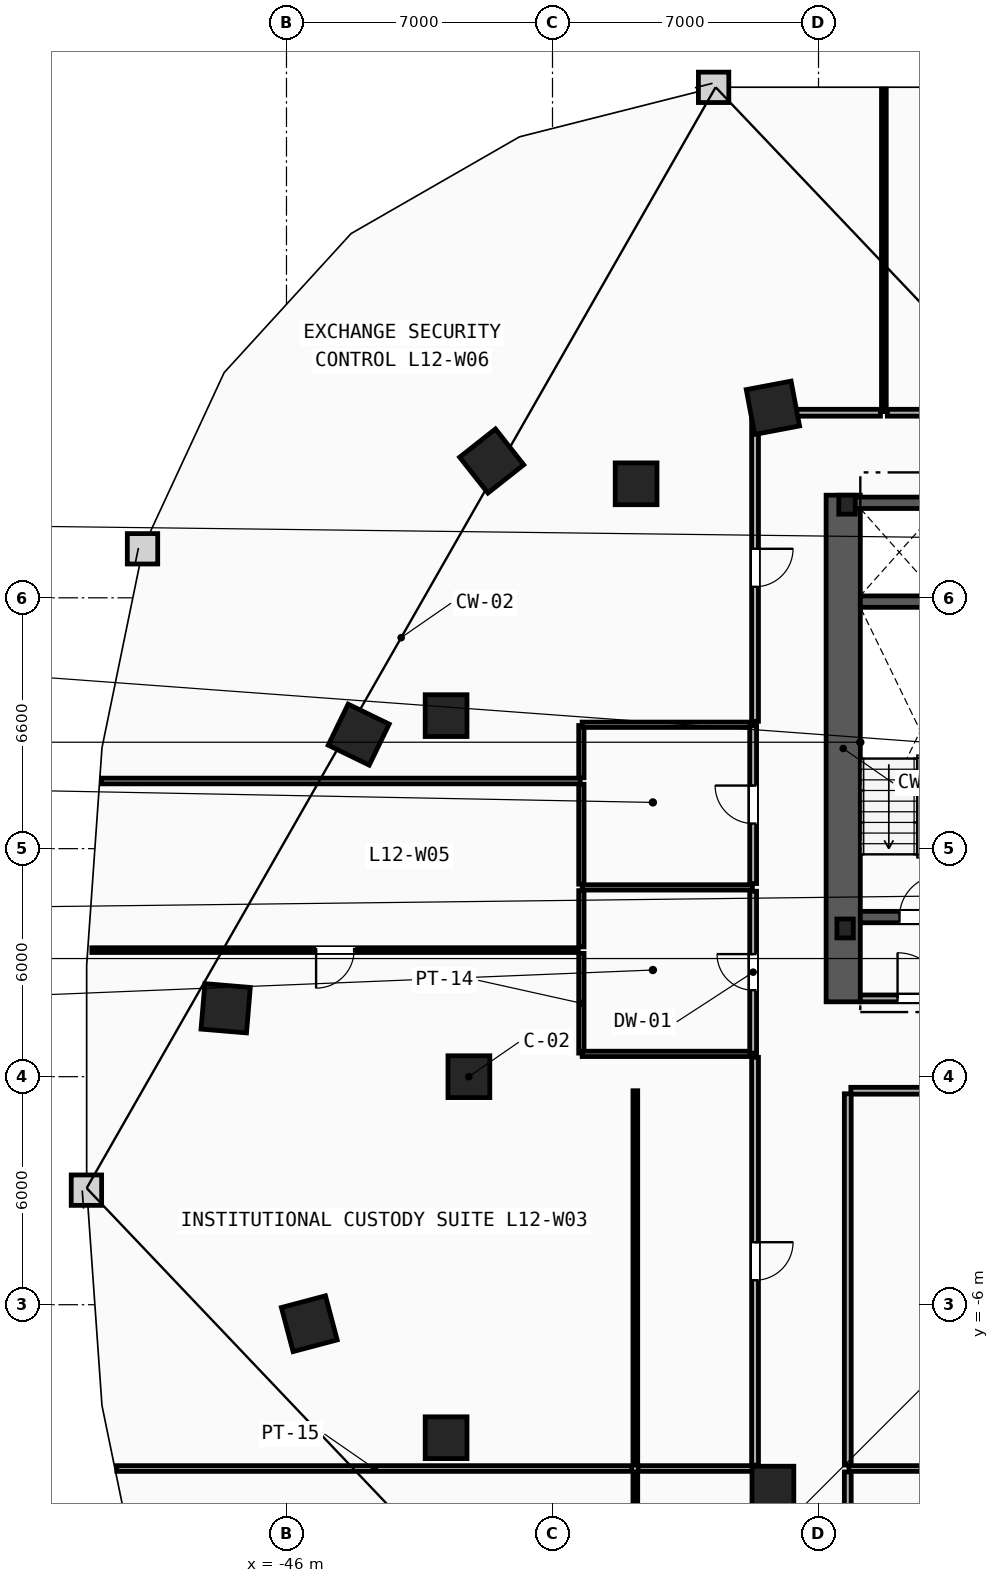
"""IFC4 building model, lengths in metres.
Left out: names, types, materials, properties, quantities, classifications, styles, units other than length and angle.
Written with IfcOpenShell. Run it as: python <this file> out.ifc"""

import sys

from ifc_helpers import new_model, si_unit, direction, frame, frame_2d, origin, origin_2d, place, context, subcontext, project, spatial, rectangle, i_section, extrude, element, fill, save


model = new_model("IFC4")
c1 = context("Model", 3, precision=1e-05, world=origin(), true_north=direction((0.0, 1.0)))
c2 = subcontext(c1, "Body", "Model", "MODEL_VIEW")
j1 = project(units=[si_unit("LENGTHUNIT", "METRE"), si_unit("PLANEANGLEUNIT", "RADIAN")], contexts=[c1])
p1 = place(None, origin())
s1 = spatial("IfcSite", under=j1, at=p1, CompositionType="ELEMENT")
p2 = place(p1, origin())
s2 = spatial("IfcBuilding", under=s1, at=p2, CompositionType="ELEMENT")
p3 = place(p2, frame((0.0, 0.0, 50.6)))
s3 = spatial("IfcBuildingStorey", under=s2, at=p3, CompositionType="ELEMENT", Elevation=50.6)
for number, where, z_axis, x_axis in (
    (1, (-31.3, 3.9, 0.0), (0.0, 0.0, 1.0), (1.0, 0.0, 0.0)),
    (2, (-31.25, 15.05, 0.0), (0.0, 0.0, 1.0), (1.0, 0.0, 0.0)),
):
    element("IfcColumn", number, at=place(p3, frame(where, z_axis=z_axis, x_axis=x_axis)), inside=s3, PredefinedType="COLUMN", context=c2, shape_type="SweptSolid", body=[
        extrude(i_section(OverallWidth=0.432, OverallDepth=0.498, WebThickness=0.056, FlangeThickness=0.089, FilletRadius=0.018, at=origin_2d()), origin(), (0.0, 0.0, 1.0), 3.8),
    ])
for number, where, z_axis, x_axis in (
    (3, (-41.2, 0.0, 0.0), (0.0, 0.0, 1.0), (1.0, 0.0, 0.0)),
    (4, (-41.8, 9.5, 0.0), (0.0, 0.0, 1.0), (1.0, 0.0, 0.0)),
    (5, (-36.8, 15.6, 0.0), (0.0, 0.0, 1.0), (1.0, 0.0, 0.0)),
    (6, (-41.8, -9.5, 0.0), (0.0, 0.0, 1.0), (1.0, 0.0, 0.0)),
    (7, (-33.2, -10.8, 0.0), (0.0, 0.0, 1.0), (1.0, 0.0, 0.0)),
):
    element("IfcColumn", number, at=place(p3, frame(where, z_axis=z_axis, x_axis=x_axis)), inside=s3, PredefinedType="COLUMN", context=c2, shape_type="SweptSolid", body=[
        extrude(rectangle(XDim=1.1, YDim=1.1, at=origin_2d()), origin(), (0.0, 0.0, 1.0), 3.8),
    ])
for number, where, z_axis, x_axis in (
    (8, (-33.2, 17.6, 0.0), (0.0, 0.0, 1.0), (-0.983, -0.186, 0.0)),
    (9, (-40.6, 16.2, 0.0), (0.0, 0.0, 1.0), (-0.785, -0.619, 0.0)),
    (10, (-44.1, 9.0, 0.0), (0.0, 0.0, 1.0), (-0.437, -0.899, 0.0)),
    (11, (-47.6, 1.8, 0.0), (0.0, 0.0, 1.0), (-0.084, -0.997, 0.0)),
    (12, (-45.4, -6.5, 0.0), (0.0, 0.0, 1.0), (0.256, -0.967, 0.0)),
):
    element("IfcColumn", number, at=place(p3, frame(where, z_axis=z_axis, x_axis=x_axis)), inside=s3, PredefinedType="COLUMN", context=c2, shape_type="SweptSolid", body=[
        extrude(rectangle(XDim=1.2, YDim=1.2, at=origin_2d()), origin(), (0.0, 0.0, 1.0), 3.8),
    ])
p4 = place(p3, frame((-31.35, 1.97, 0.0), z_axis=(0.0, 0.0, 1.0), x_axis=(0.0, 1.0, 0.0)))
e13 = element("IfcWall", 13, at=p4, inside=s3, PredefinedType="SHEAR", context=c2, shape_type="SweptSolid", body=[
    extrude(rectangle(XDim=13.33, YDim=0.9, at=frame_2d((6.665, 0.0))), origin(), (0.0, 0.0, 1.0), 3.5),
])
p5 = place(p3, frame((-30.9, 4.2, 0.0), z_axis=(0.0, 0.0, 1.0), x_axis=(1.0, 0.0, 0.0)))
e14 = element("IfcWall", 14, at=p5, inside=s3, PredefinedType="SHEAR", context=c2, shape_type="SweptSolid", body=[
    extrude(rectangle(XDim=3.16, YDim=0.3, at=frame_2d((1.58, 0.0))), origin(), (0.0, 0.0, 1.0), 3.5),
])
p6 = place(p5, frame((1.03, 0.0, 0.0)))
e15 = element("IfcOpeningElement", 15, at=p6, cuts=e14, PredefinedType="OPENING", context=c2, shape_type="SweptSolid", body=[
    extrude(rectangle(XDim=1.1, YDim=2.15, at=frame_2d((0.55, 1.075))), frame((0.0, 0.16, 0.0), z_axis=(0.0, -1.0, 0.0), x_axis=(1.0, 0.0, 0.0)), (0.0, 0.0, 1.0), 0.32),
])
p7 = place(p3, frame((-30.9, 12.5, 0.0), z_axis=(0.0, 0.0, 1.0), x_axis=(1.0, 0.0, 0.0)))
e16 = element("IfcWall", 16, at=p7, inside=s3, PredefinedType="SHEAR", context=c2, shape_type="SweptSolid", body=[
    extrude(rectangle(XDim=3.16, YDim=0.3, at=frame_2d((1.58, 0.0))), origin(), (0.0, 0.0, 1.0), 3.5),
])
p8 = place(p3, frame((-30.9, 2.06, 0.0), z_axis=(0.0, 0.0, 1.0), x_axis=(1.0, 0.0, 0.0)))
e17 = element("IfcWall", 17, at=p8, inside=s3, PredefinedType="PARTITIONING", context=c2, shape_type="SweptSolid", body=[
    extrude(rectangle(XDim=3.16, YDim=0.18, at=frame_2d((1.58, 0.0))), origin(), (0.0, 0.0, 1.0), 3.5),
])
p9 = place(p8, frame((0.98, 0.0, 0.0)))
e18 = element("IfcOpeningElement", 18, at=p9, cuts=e17, PredefinedType="OPENING", context=c2, shape_type="SweptSolid", body=[
    extrude(rectangle(XDim=1.2, YDim=2.15, at=frame_2d((0.6, 1.075))), frame((0.0, 0.1, 0.0), z_axis=(0.0, -1.0, 0.0), x_axis=(1.0, 0.0, 0.0)), (0.0, 0.0, 1.0), 0.2),
])
p10 = place(p3, frame((-31.2, 15.1, 0.0), z_axis=(0.0, 0.0, 1.0), x_axis=(1.0, 0.0, 0.0)))
e19 = element("IfcWall", 19, at=p10, inside=s3, PredefinedType="SHEAR", context=c2, shape_type="SweptSolid", body=[
    extrude(rectangle(XDim=2.5, YDim=0.3, at=frame_2d((1.25, 0.0))), origin(), (0.0, 0.0, 1.0), 3.5),
])
p11 = place(p3, frame((-38.24, 0.62, 0.0), z_axis=(0.0, 0.0, 1.0), x_axis=(0.0, 1.0, 0.0)))
e20 = element("IfcWall", 20, at=p11, inside=s3, PredefinedType="PARTITIONING", context=c2, shape_type="SweptSolid", body=[
    extrude(rectangle(XDim=2.625, YDim=0.14, at=frame_2d((1.312, 0.0))), origin(), (0.0, 0.0, 1.0), 3.5),
])
p12 = place(p3, frame((-38.24, 3.415, 0.0), z_axis=(0.0, 0.0, 1.0), x_axis=(0.0, 1.0, 0.0)))
e21 = element("IfcWall", 21, at=p12, inside=s3, PredefinedType="PARTITIONING", context=c2, shape_type="SweptSolid", body=[
    extrude(rectangle(XDim=1.48, YDim=0.14, at=frame_2d((0.74, 0.0))), origin(), (0.0, 0.0, 1.0), 3.5),
])
p13 = place(p3, frame((-38.24, 5.065, 0.0), z_axis=(0.0, 0.0, 1.0), x_axis=(0.0, 1.0, 0.0)))
e22 = element("IfcWall", 22, at=p13, inside=s3, PredefinedType="PARTITIONING", context=c2, shape_type="SweptSolid", body=[
    extrude(rectangle(XDim=2.63, YDim=0.14, at=frame_2d((1.315, 0.0))), origin(), (0.0, 0.0, 1.0), 3.5),
])
p14 = place(p3, frame((-38.24, 7.865, 0.0), z_axis=(0.0, 0.0, 1.0), x_axis=(0.0, 1.0, 0.0)))
e23 = element("IfcWall", 23, at=p14, inside=s3, PredefinedType="PARTITIONING", context=c2, shape_type="SweptSolid", body=[
    extrude(rectangle(XDim=1.375, YDim=0.14, at=frame_2d((0.688, 0.0))), origin(), (0.0, 0.0, 1.0), 3.5),
])
for number, where, z_axis, x_axis in (
    (24, (-38.22, 0.6, 0.0), (0.0, 0.0, 1.0), (1.0, 0.0, 0.0)),
    (25, (-38.22, 4.98, 0.0), (0.0, 0.0, 1.0), (1.0, 0.0, 0.0)),
    (26, (-38.22, 9.26, 0.0), (0.0, 0.0, 1.0), (1.0, 0.0, 0.0)),
):
    element("IfcWall", number, at=place(p3, frame(where, z_axis=z_axis, x_axis=x_axis)), inside=s3, PredefinedType="PARTITIONING", context=c2, shape_type="SweptSolid", body=[
        extrude(rectangle(XDim=4.48, YDim=0.14, at=frame_2d((2.24, 0.0))), origin(), (0.0, 0.0, 1.0), 3.5),
    ])
p15 = place(p3, frame((-33.72, 0.62, 0.0), z_axis=(0.0, 0.0, 1.0), x_axis=(0.0, 1.0, 0.0)))
e27 = element("IfcWall", 27, at=p15, inside=s3, PredefinedType="PARTITIONING", context=c2, shape_type="SweptSolid", body=[
    extrude(rectangle(XDim=4.26, YDim=0.18, at=frame_2d((2.13, 0.0))), origin(), (0.0, 0.0, 1.0), 3.5),
])
p16 = place(p15, frame((1.655, 0.0, 0.0)))
e28 = element("IfcOpeningElement", 28, at=p16, cuts=e27, PredefinedType="OPENING", context=c2, shape_type="SweptSolid", body=[
    extrude(rectangle(XDim=0.95, YDim=2.1, at=frame_2d((0.475, 1.05))), frame((0.0, 0.1, 0.0), z_axis=(0.0, -1.0, 0.0), x_axis=(1.0, 0.0, 0.0)), (0.0, 0.0, 1.0), 0.2),
])
p17 = place(p3, frame((-33.72, 5.08, 0.0), z_axis=(0.0, 0.0, 1.0), x_axis=(0.0, 1.0, 0.0)))
e29 = element("IfcWall", 29, at=p17, inside=s3, PredefinedType="PARTITIONING", context=c2, shape_type="SweptSolid", body=[
    extrude(rectangle(XDim=4.16, YDim=0.18, at=frame_2d((2.08, 0.0))), origin(), (0.0, 0.0, 1.0), 3.5),
])
p18 = place(p17, frame((1.58, 0.0, 0.0)))
e30 = element("IfcOpeningElement", 30, at=p18, cuts=e29, PredefinedType="OPENING", context=c2, shape_type="SweptSolid", body=[
    extrude(rectangle(XDim=1.0, YDim=2.15, at=frame_2d((0.5, 1.075))), frame((0.0, 0.1, 0.0), z_axis=(0.0, -1.0, 0.0), x_axis=(1.0, 0.0, 0.0)), (0.0, 0.0, 1.0), 0.2),
])
p19 = place(p3, frame((-36.82, -11.45, 0.0), z_axis=(0.0, 0.0, 1.0), x_axis=(0.0, 1.0, 0.0)))
e31 = element("IfcWall", 31, at=p19, inside=s3, PredefinedType="PARTITIONING", context=c2, shape_type="SweptSolid", body=[
    extrude(rectangle(XDim=1.055, YDim=0.125, at=frame_2d((0.527, 0.0))), origin(), (0.0, 0.0, 1.0), 3.5),
])
p20 = place(p3, frame((-36.82, -10.225, 0.0), z_axis=(0.0, 0.0, 1.0), x_axis=(0.0, 1.0, 0.0)))
e32 = element("IfcWall", 32, at=p20, inside=s3, PredefinedType="PARTITIONING", context=c2, shape_type="SweptSolid", body=[
    extrude(rectangle(XDim=9.855, YDim=0.125, at=frame_2d((4.927, 0.0))), origin(), (0.0, 0.0, 1.0), 3.5),
])
p21 = place(p3, frame((-50.464, -10.31, 0.0), z_axis=(0.0, 0.0, 1.0), x_axis=(1.0, 0.0, 0.0)))
e33 = element("IfcWall", 33, at=p21, inside=s3, PredefinedType="PARTITIONING", context=c2, shape_type="SweptSolid", body=[
    extrude(rectangle(XDim=13.549, YDim=0.15, at=frame_2d((6.774, 0.0))), origin(), (0.0, 0.0, 1.0), 2.805),
])
p22 = place(p3, frame((-36.745, -10.31, 0.0), z_axis=(0.0, 0.0, 1.0), x_axis=(1.0, 0.0, 0.0)))
e34 = element("IfcWall", 34, at=p22, inside=s3, PredefinedType="PARTITIONING", context=c2, shape_type="SweptSolid", body=[
    extrude(rectangle(XDim=3.045, YDim=0.15, at=frame_2d((1.522, 0.0))), origin(), (0.0, 0.0, 1.0), 2.805),
])
p23 = place(p3, frame((-31.2, -10.31, 0.0), z_axis=(0.0, 0.0, 1.0), x_axis=(1.0, 0.0, 0.0)))
e35 = element("IfcWall", 35, at=p23, inside=s3, PredefinedType="PARTITIONING", context=c2, shape_type="SweptSolid", body=[
    extrude(rectangle(XDim=17.664, YDim=0.15, at=frame_2d((8.832, 0.0))), origin(), (0.0, 0.0, 1.0), 2.805),
])
p24 = place(p3, frame((-50.866, 7.78, 0.0), z_axis=(0.0, 0.0, 1.0), x_axis=(1.0, 0.0, 0.0)))
e36 = element("IfcWall", 36, at=p24, inside=s3, PredefinedType="PARTITIONING", context=c2, shape_type="SweptSolid", body=[
    extrude(rectangle(XDim=12.596, YDim=0.15, at=frame_2d((6.298, 0.0))), origin(), (0.0, 0.0, 1.0), 3.5),
])
p25 = place(p3, frame((-30.28, 17.5, 0.0), z_axis=(0.0, 0.0, 1.0), x_axis=(0.0, 1.0, 0.0)))
e37 = element("IfcWall", 37, at=p25, inside=s3, PredefinedType="PARTITIONING", context=c2, shape_type="SweptSolid", body=[
    extrude(rectangle(XDim=8.485, YDim=0.125, at=frame_2d((4.243, 0.0))), origin(), (0.0, 0.0, 1.0), 3.5),
])
p26 = place(p3, frame((-31.23, -11.4, 0.0), z_axis=(0.0, 0.0, 1.0), x_axis=(0.0, 1.0, 0.0)))
e38 = element("IfcWall", 38, at=p26, inside=s3, PredefinedType="PARTITIONING", context=c2, shape_type="SweptSolid", body=[
    extrude(rectangle(XDim=1.0, YDim=0.18, at=frame_2d((0.5, 0.0))), origin(), (0.0, 0.0, 1.0), 3.5),
])
p27 = place(p3, frame((-33.67, 0.509, 0.0), z_axis=(0.0, 0.0, 1.0), x_axis=(0.0, -1.0, 0.0)))
e39 = element("IfcWall", 39, at=p27, inside=s3, PredefinedType="PARTITIONING", context=c2, shape_type="SweptSolid", body=[
    extrude(rectangle(XDim=10.729, YDim=0.18, at=frame_2d((5.364, 0.0))), origin(), (0.0, 0.0, 1.0), 3.5),
])
p28 = place(p27, frame((4.864, 0.0, 0.0)))
e40 = element("IfcOpeningElement", 40, at=p28, cuts=e39, PredefinedType="OPENING", context=c2, shape_type="SweptSolid", body=[
    extrude(rectangle(XDim=1.0, YDim=2.15, at=frame_2d((0.5, 1.075))), frame((0.0, 0.1, 0.0), z_axis=(0.0, -1.0, 0.0), x_axis=(1.0, 0.0, 0.0)), (0.0, 0.0, 1.0), 0.2),
])
p29 = place(p3, frame((-31.15, -0.37, 0.0), z_axis=(0.0, 0.0, 1.0), x_axis=(1.0, 0.0, 0.0)))
e41 = element("IfcWall", 41, at=p29, inside=s3, PredefinedType="PARTITIONING", context=c2, shape_type="SweptSolid", body=[
    extrude(rectangle(XDim=14.328, YDim=0.18, at=frame_2d((7.164, 0.0))), origin(), (0.0, 0.0, 1.0), 3.5),
])
p30 = place(p29, frame((6.664, 0.0, 0.0)))
e42 = element("IfcOpeningElement", 42, at=p30, cuts=e41, PredefinedType="OPENING", context=c2, shape_type="SweptSolid", body=[
    extrude(rectangle(XDim=1.0, YDim=2.15, at=frame_2d((0.5, 1.075))), frame((0.0, 0.1, 0.0), z_axis=(0.0, -1.0, 0.0), x_axis=(1.0, 0.0, 0.0)), (0.0, 0.0, 1.0), 0.2),
])
p31 = place(p3, frame((-16.822, 17.47, 0.0), z_axis=(0.0, 0.0, 1.0), x_axis=(-1.0, 0.0, 0.0)))
e43 = element("IfcWall", 43, at=p31, inside=s3, PredefinedType="PARTITIONING", context=c2, shape_type="SweptSolid", body=[
    extrude(rectangle(XDim=13.368, YDim=0.18, at=frame_2d((6.684, 0.0))), origin(), (0.0, 0.0, 1.0), 3.5),
])
p32 = place(p3, frame((-31.23, -10.22, 0.0), z_axis=(0.0, 0.0, 1.0), x_axis=(0.0, 1.0, 0.0)))
e44 = element("IfcWall", 44, at=p32, inside=s3, PredefinedType="PARTITIONING", context=c2, shape_type="SweptSolid", body=[
    extrude(rectangle(XDim=9.77, YDim=0.18, at=frame_2d((4.885, 0.0))), origin(), (0.0, 0.0, 1.0), 3.5),
])
p33 = place(p3, frame((-33.67, 17.428, 0.0), z_axis=(0.0, 0.0, 1.0), x_axis=(0.0, -1.0, 0.0)))
e45 = element("IfcWall", 45, at=p33, inside=s3, PredefinedType="PARTITIONING", context=c2, shape_type="SweptSolid", body=[
    extrude(rectangle(XDim=8.077, YDim=0.18, at=frame_2d((4.039, 0.0))), origin(), (0.0, 0.0, 1.0), 3.5),
])
p34 = place(p33, frame((3.539, 0.0, 0.0)))
e46 = element("IfcOpeningElement", 46, at=p34, cuts=e45, PredefinedType="OPENING", context=c2, shape_type="SweptSolid", body=[
    extrude(rectangle(XDim=1.0, YDim=2.15, at=frame_2d((0.5, 1.075))), frame((0.0, 0.1, 0.0), z_axis=(0.0, -1.0, 0.0), x_axis=(1.0, 0.0, 0.0)), (0.0, 0.0, 1.0), 0.2),
])
p35 = place(p3, frame((-30.37, 17.47, 0.0), z_axis=(0.0, 0.0, 1.0), x_axis=(-1.0, 0.0, 0.0)))
e47 = element("IfcWall", 47, at=p35, inside=s3, PredefinedType="PARTITIONING", context=c2, shape_type="SweptSolid", body=[
    extrude(rectangle(XDim=3.258, YDim=0.18, at=frame_2d((1.629, 0.0))), origin(), (0.0, 0.0, 1.0), 3.5),
])
p36 = place(p3, frame((-38.32, 3.33, 0.0), z_axis=(0.0, 0.0, 1.0), x_axis=(-1.0, 0.0, 0.0)))
e48 = element("IfcWall", 48, at=p36, inside=s3, PredefinedType="PARTITIONING", context=c2, shape_type="SweptSolid", body=[
    extrude(rectangle(XDim=12.801, YDim=0.125, at=frame_2d((6.401, 0.0))), origin(), (0.0, 0.0, 1.0), 3.5),
])
p37 = place(p36, frame((5.901, 0.0, 0.0)))
e49 = element("IfcOpeningElement", 49, at=p37, cuts=e48, PredefinedType="OPENING", context=c2, shape_type="SweptSolid", body=[
    extrude(rectangle(XDim=1.0, YDim=2.15, at=frame_2d((0.5, 1.075))), frame((0.0, 0.073, 0.0), z_axis=(0.0, -1.0, 0.0), x_axis=(1.0, 0.0, 0.0)), (0.0, 0.0, 1.0), 0.145),
])
p38 = place(p6, origin())
e50 = element("IfcDoor", 50, at=p38, inside=s3, OperationType="SINGLE_SWING_RIGHT", PredefinedType="DOOR", context=c2, shape_type="SweptSolid", body=[
    extrude(rectangle(XDim=1.1, YDim=2.15, at=frame_2d((0.55, 1.075))), frame((0.0, 0.025, 0.0), z_axis=(0.0, -1.0, 0.0), x_axis=(1.0, 0.0, 0.0)), (0.0, 0.0, 1.0), 0.05),
])
fill(e15, e50)
p39 = place(p9, origin())
e51 = element("IfcDoor", 51, at=p39, inside=s3, OperationType="SINGLE_SWING_LEFT", PredefinedType="DOOR", context=c2, shape_type="SweptSolid", body=[
    extrude(rectangle(XDim=1.2, YDim=2.15, at=frame_2d((0.6, 1.075))), frame((0.0, 0.025, 0.0), z_axis=(0.0, -1.0, 0.0), x_axis=(1.0, 0.0, 0.0)), (0.0, 0.0, 1.0), 0.05),
])
fill(e18, e51)
p40 = place(p37, origin())
e52 = element("IfcDoor", 52, at=p40, inside=s3, OperationType="SINGLE_SWING_RIGHT", PredefinedType="DOOR", context=c2, shape_type="SweptSolid", body=[
    extrude(rectangle(XDim=1.0, YDim=2.15, at=frame_2d((0.5, 1.075))), frame((0.0, 0.025, 0.0), z_axis=(0.0, -1.0, 0.0), x_axis=(1.0, 0.0, 0.0)), (0.0, 0.0, 1.0), 0.05),
])
fill(e49, e52)
p41 = place(p28, origin())
e53 = element("IfcDoor", 53, at=p41, inside=s3, OperationType="SINGLE_SWING_LEFT", PredefinedType="DOOR", context=c2, shape_type="SweptSolid", body=[
    extrude(rectangle(XDim=1.0, YDim=2.15, at=frame_2d((0.5, 1.075))), frame((0.0, 0.025, 0.0), z_axis=(0.0, -1.0, 0.0), x_axis=(1.0, 0.0, 0.0)), (0.0, 0.0, 1.0), 0.05),
])
fill(e40, e53)
p42 = place(p34, origin())
e54 = element("IfcDoor", 54, at=p42, inside=s3, OperationType="SINGLE_SWING_LEFT", PredefinedType="DOOR", context=c2, shape_type="SweptSolid", body=[
    extrude(rectangle(XDim=1.0, YDim=2.15, at=frame_2d((0.5, 1.075))), frame((0.0, 0.025, 0.0), z_axis=(0.0, -1.0, 0.0), x_axis=(1.0, 0.0, 0.0)), (0.0, 0.0, 1.0), 0.05),
])
fill(e46, e54)
p43 = place(p16, origin())
e55 = element("IfcDoor", 55, at=p43, inside=s3, OperationType="SINGLE_SWING_RIGHT", PredefinedType="DOOR", context=c2, shape_type="SweptSolid", body=[
    extrude(rectangle(XDim=0.95, YDim=2.1, at=frame_2d((0.475, 1.05))), frame((0.0, 0.025, 0.0), z_axis=(0.0, -1.0, 0.0), x_axis=(1.0, 0.0, 0.0)), (0.0, 0.0, 1.0), 0.05),
])
fill(e28, e55)
p44 = place(p18, origin())
e56 = element("IfcDoor", 56, at=p44, inside=s3, OperationType="SINGLE_SWING_RIGHT", PredefinedType="DOOR", context=c2, shape_type="SweptSolid", body=[
    extrude(rectangle(XDim=1.0, YDim=2.15, at=frame_2d((0.5, 1.075))), frame((0.0, 0.025, 0.0), z_axis=(0.0, -1.0, 0.0), x_axis=(1.0, 0.0, 0.0)), (0.0, 0.0, 1.0), 0.05),
])
fill(e30, e56)
save(model, sys.argv[1])
